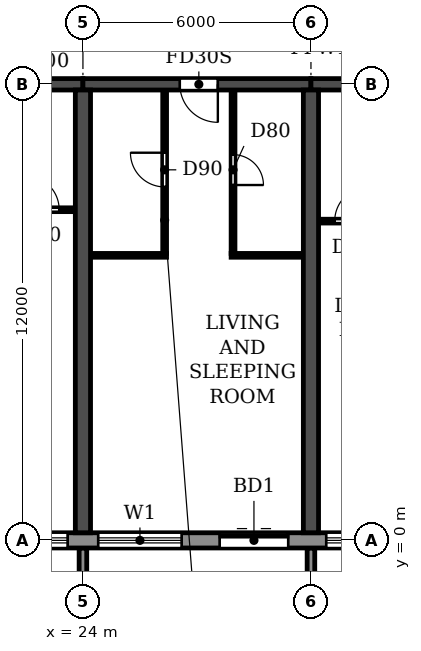
"""IFC4 building model, lengths in metres.
Left out: names, types, materials, properties, quantities, classifications, styles, units other than length and angle.
Written with IfcOpenShell. Run it as: python <this file> out.ifc"""

import sys

from ifc_helpers import new_model, si_unit, direction, frame, frame_2d, origin, place, context, subcontext, project, spatial, polyline, rectangle, outline, extrude, source, transform, mapped, element, fill, save


model = new_model("IFC4")
c1 = context("Model", 3, precision=1e-05, world=origin(), true_north=direction((0.0, 1.0)))
c2 = subcontext(c1, "Body", "Model", "MODEL_VIEW")
j1 = project(units=[si_unit("LENGTHUNIT", "METRE"), si_unit("PLANEANGLEUNIT", "RADIAN")], contexts=[c1])
p1 = place(None, origin())
s1 = spatial("IfcSite", under=j1, at=p1, CompositionType="ELEMENT")
p2 = place(p1, origin())
s2 = spatial("IfcBuilding", under=s1, at=p2, CompositionType="ELEMENT")
p3 = place(p2, frame((0.0, 0.0, 33.3)))
s3 = spatial("IfcBuildingStorey", under=s2, at=p3, CompositionType="ELEMENT", Elevation=33.3)
for number, where, z_axis, x_axis in (
    (1, (24.0, 0.2, 0.0), (0.0, 0.0, 1.0), (0.0, 1.0, 0.0)),
    (2, (30.0, 0.2, 0.0), (0.0, 0.0, 1.0), (0.0, 1.0, 0.0)),
):
    element("IfcWall", number, at=place(p3, frame(where, z_axis=z_axis, x_axis=x_axis)), inside=s3, PredefinedType="SHEAR", context=c2, shape_type="SweptSolid", body=[
        extrude(rectangle(XDim=11.65, YDim=0.4, at=frame_2d((5.825, 0.0))), origin(), (0.0, 0.0, 1.0), 3.05),
    ])
p4 = place(p3, frame((18.0, 12.0, 0.0), z_axis=(0.0, 0.0, 1.0), x_axis=(1.0, 0.0, 0.0)))
e3 = element("IfcWall", 3, at=p4, inside=s3, PredefinedType="SHEAR", context=c2, shape_type="SweptSolid", body=[
    extrude(rectangle(XDim=6.0, YDim=0.3, at=frame_2d((3.0, 0.0))), origin(), (0.0, 0.0, 1.0), 2.45),
])
p5 = place(p4, frame((2.45, 0.0, 0.0)))
e4 = element("IfcOpeningElement", 4, at=p5, cuts=e3, PredefinedType="OPENING", context=c2, shape_type="SweptSolid", body=[
    extrude(rectangle(XDim=1.0, YDim=2.1, at=frame_2d((0.5, 1.05))), frame((0.0, 0.16, 0.0), z_axis=(0.0, -1.0, 0.0), x_axis=(1.0, 0.0, 0.0)), (0.0, 0.0, 1.0), 0.32),
])
p6 = place(p3, frame((24.0, 12.0, 0.0), z_axis=(0.0, 0.0, 1.0), x_axis=(1.0, 0.0, 0.0)))
e5 = element("IfcWall", 5, at=p6, inside=s3, PredefinedType="SHEAR", context=c2, shape_type="SweptSolid", body=[
    extrude(rectangle(XDim=6.0, YDim=0.3, at=frame_2d((3.0, 0.0))), origin(), (0.0, 0.0, 1.0), 2.45),
])
p7 = place(p6, frame((2.55, 0.0, 0.0)))
e6 = element("IfcOpeningElement", 6, at=p7, cuts=e5, PredefinedType="OPENING", context=c2, shape_type="SweptSolid", body=[
    extrude(rectangle(XDim=1.0, YDim=2.1, at=frame_2d((0.5, 1.05))), frame((0.0, 0.16, 0.0), z_axis=(0.0, -1.0, 0.0), x_axis=(1.0, 0.0, 0.0)), (0.0, 0.0, 1.0), 0.32),
])
p8 = place(p3, frame((30.0, 12.0, 0.0), z_axis=(0.0, 0.0, 1.0), x_axis=(1.0, 0.0, 0.0)))
e7 = element("IfcWall", 7, at=p8, inside=s3, PredefinedType="SHEAR", context=c2, shape_type="SweptSolid", body=[
    extrude(rectangle(XDim=6.0, YDim=0.3, at=frame_2d((3.0, 0.0))), origin(), (0.0, 0.0, 1.0), 2.45),
])
p9 = place(p8, frame((2.55, 0.0, 0.0)))
e8 = element("IfcOpeningElement", 8, at=p9, cuts=e7, PredefinedType="OPENING", context=c2, shape_type="SweptSolid", body=[
    extrude(rectangle(XDim=1.0, YDim=2.1, at=frame_2d((0.5, 1.05))), frame((0.0, 0.16, 0.0), z_axis=(0.0, -1.0, 0.0), x_axis=(1.0, 0.0, 0.0)), (0.0, 0.0, 1.0), 0.32),
])
p10 = place(p3, frame((4.683, 0.0, 0.0), z_axis=(0.0, 0.0, 1.0), x_axis=(1.0, 0.0, 0.0)))
e9 = element("IfcWall", 9, at=p10, inside=s3, PredefinedType="STANDARD", context=c2, shape_type="SweptSolid", body=[
    extrude(rectangle(XDim=92.634, YDim=0.4, at=frame_2d((46.317, 0.0))), origin(), (0.0, 0.0, 1.0), 3.05),
])
p11 = place(p10, frame((1.717, 0.0, 0.9)))
e10 = element("IfcOpeningElement", 10, at=p11, cuts=e9, PredefinedType="OPENING", context=c2, shape_type="SweptSolid", body=[
    extrude(rectangle(XDim=2.2, YDim=1.5, at=frame_2d((1.1, 0.75))), frame((0.0, 0.21, 0.0), z_axis=(0.0, -1.0, 0.0), x_axis=(1.0, 0.0, 0.0)), (0.0, 0.0, 1.0), 0.42),
])
p12 = place(p10, frame((4.717, 0.0, 0.9)))
e11 = element("IfcOpeningElement", 11, at=p12, cuts=e9, PredefinedType="OPENING", context=c2, shape_type="SweptSolid", body=[
    extrude(rectangle(XDim=2.2, YDim=1.5, at=frame_2d((1.1, 0.75))), frame((0.0, 0.21, 0.0), z_axis=(0.0, -1.0, 0.0), x_axis=(1.0, 0.0, 0.0)), (0.0, 0.0, 1.0), 0.42),
])
p13 = place(p10, frame((7.917, 0.0, 0.0)))
e12 = element("IfcOpeningElement", 12, at=p13, cuts=e9, PredefinedType="OPENING", context=c2, shape_type="SweptSolid", body=[
    extrude(rectangle(XDim=1.8, YDim=2.4, at=frame_2d((0.9, 1.2))), frame((0.0, 0.21, 0.0), z_axis=(0.0, -1.0, 0.0), x_axis=(1.0, 0.0, 0.0)), (0.0, 0.0, 1.0), 0.42),
])
p14 = place(p10, frame((10.717, 0.0, 0.9)))
e13 = element("IfcOpeningElement", 13, at=p14, cuts=e9, PredefinedType="OPENING", context=c2, shape_type="SweptSolid", body=[
    extrude(rectangle(XDim=2.2, YDim=1.5, at=frame_2d((1.1, 0.75))), frame((0.0, 0.21, 0.0), z_axis=(0.0, -1.0, 0.0), x_axis=(1.0, 0.0, 0.0)), (0.0, 0.0, 1.0), 0.42),
])
p15 = place(p10, frame((13.717, 0.0, 0.9)))
e14 = element("IfcOpeningElement", 14, at=p15, cuts=e9, PredefinedType="OPENING", context=c2, shape_type="SweptSolid", body=[
    extrude(rectangle(XDim=2.2, YDim=1.5, at=frame_2d((1.1, 0.75))), frame((0.0, 0.21, 0.0), z_axis=(0.0, -1.0, 0.0), x_axis=(1.0, 0.0, 0.0)), (0.0, 0.0, 1.0), 0.42),
])
p16 = place(p10, frame((16.717, 0.0, 0.9)))
e15 = element("IfcOpeningElement", 15, at=p16, cuts=e9, PredefinedType="OPENING", context=c2, shape_type="SweptSolid", body=[
    extrude(rectangle(XDim=2.2, YDim=1.5, at=frame_2d((1.1, 0.75))), frame((0.0, 0.21, 0.0), z_axis=(0.0, -1.0, 0.0), x_axis=(1.0, 0.0, 0.0)), (0.0, 0.0, 1.0), 0.42),
])
p17 = place(p10, frame((19.717, 0.0, 0.9)))
e16 = element("IfcOpeningElement", 16, at=p17, cuts=e9, PredefinedType="OPENING", context=c2, shape_type="SweptSolid", body=[
    extrude(rectangle(XDim=2.2, YDim=1.5, at=frame_2d((1.1, 0.75))), frame((0.0, 0.21, 0.0), z_axis=(0.0, -1.0, 0.0), x_axis=(1.0, 0.0, 0.0)), (0.0, 0.0, 1.0), 0.42),
])
p18 = place(p10, frame((22.917, 0.0, 0.0)))
e17 = element("IfcOpeningElement", 17, at=p18, cuts=e9, PredefinedType="OPENING", context=c2, shape_type="SweptSolid", body=[
    extrude(rectangle(XDim=1.8, YDim=2.4, at=frame_2d((0.9, 1.2))), frame((0.0, 0.21, 0.0), z_axis=(0.0, -1.0, 0.0), x_axis=(1.0, 0.0, 0.0)), (0.0, 0.0, 1.0), 0.42),
])
p19 = place(p10, frame((25.717, 0.0, 0.9)))
e18 = element("IfcOpeningElement", 18, at=p19, cuts=e9, PredefinedType="OPENING", context=c2, shape_type="SweptSolid", body=[
    extrude(rectangle(XDim=2.2, YDim=1.5, at=frame_2d((1.1, 0.75))), frame((0.0, 0.21, 0.0), z_axis=(0.0, -1.0, 0.0), x_axis=(1.0, 0.0, 0.0)), (0.0, 0.0, 1.0), 0.42),
])
p20 = place(p10, frame((28.717, 0.0, 0.9)))
e19 = element("IfcOpeningElement", 19, at=p20, cuts=e9, PredefinedType="OPENING", context=c2, shape_type="SweptSolid", body=[
    extrude(rectangle(XDim=2.2, YDim=1.5, at=frame_2d((1.1, 0.75))), frame((0.0, 0.21, 0.0), z_axis=(0.0, -1.0, 0.0), x_axis=(1.0, 0.0, 0.0)), (0.0, 0.0, 1.0), 0.42),
])
p21 = place(p10, frame((31.717, 0.0, 0.9)))
e20 = element("IfcOpeningElement", 20, at=p21, cuts=e9, PredefinedType="OPENING", context=c2, shape_type="SweptSolid", body=[
    extrude(rectangle(XDim=2.2, YDim=1.5, at=frame_2d((1.1, 0.75))), frame((0.0, 0.21, 0.0), z_axis=(0.0, -1.0, 0.0), x_axis=(1.0, 0.0, 0.0)), (0.0, 0.0, 1.0), 0.42),
])
p22 = place(p10, frame((34.717, 0.0, 0.9)))
e21 = element("IfcOpeningElement", 21, at=p22, cuts=e9, PredefinedType="OPENING", context=c2, shape_type="SweptSolid", body=[
    extrude(rectangle(XDim=2.2, YDim=1.5, at=frame_2d((1.1, 0.75))), frame((0.0, 0.21, 0.0), z_axis=(0.0, -1.0, 0.0), x_axis=(1.0, 0.0, 0.0)), (0.0, 0.0, 1.0), 0.42),
])
p23 = place(p10, frame((37.717, 0.0, 0.9)))
e22 = element("IfcOpeningElement", 22, at=p23, cuts=e9, PredefinedType="OPENING", context=c2, shape_type="SweptSolid", body=[
    extrude(rectangle(XDim=2.2, YDim=1.5, at=frame_2d((1.1, 0.75))), frame((0.0, 0.21, 0.0), z_axis=(0.0, -1.0, 0.0), x_axis=(1.0, 0.0, 0.0)), (0.0, 0.0, 1.0), 0.42),
])
p24 = place(p10, frame((40.717, 0.0, 0.9)))
e23 = element("IfcOpeningElement", 23, at=p24, cuts=e9, PredefinedType="OPENING", context=c2, shape_type="SweptSolid", body=[
    extrude(rectangle(XDim=2.2, YDim=1.5, at=frame_2d((1.1, 0.75))), frame((0.0, 0.21, 0.0), z_axis=(0.0, -1.0, 0.0), x_axis=(1.0, 0.0, 0.0)), (0.0, 0.0, 1.0), 0.42),
])
p25 = place(p10, frame((43.717, 0.0, 0.9)))
e24 = element("IfcOpeningElement", 24, at=p25, cuts=e9, PredefinedType="OPENING", context=c2, shape_type="SweptSolid", body=[
    extrude(rectangle(XDim=2.2, YDim=1.5, at=frame_2d((1.1, 0.75))), frame((0.0, 0.21, 0.0), z_axis=(0.0, -1.0, 0.0), x_axis=(1.0, 0.0, 0.0)), (0.0, 0.0, 1.0), 0.42),
])
p26 = place(p10, frame((46.917, 0.0, 0.0)))
e25 = element("IfcOpeningElement", 25, at=p26, cuts=e9, PredefinedType="OPENING", context=c2, shape_type="SweptSolid", body=[
    extrude(rectangle(XDim=1.8, YDim=2.4, at=frame_2d((0.9, 1.2))), frame((0.0, 0.21, 0.0), z_axis=(0.0, -1.0, 0.0), x_axis=(1.0, 0.0, 0.0)), (0.0, 0.0, 1.0), 0.42),
])
p27 = place(p10, frame((49.717, 0.0, 0.9)))
e26 = element("IfcOpeningElement", 26, at=p27, cuts=e9, PredefinedType="OPENING", context=c2, shape_type="SweptSolid", body=[
    extrude(rectangle(XDim=2.2, YDim=1.5, at=frame_2d((1.1, 0.75))), frame((0.0, 0.21, 0.0), z_axis=(0.0, -1.0, 0.0), x_axis=(1.0, 0.0, 0.0)), (0.0, 0.0, 1.0), 0.42),
])
p28 = place(p10, frame((52.717, 0.0, 0.9)))
e27 = element("IfcOpeningElement", 27, at=p28, cuts=e9, PredefinedType="OPENING", context=c2, shape_type="SweptSolid", body=[
    extrude(rectangle(XDim=2.2, YDim=1.5, at=frame_2d((1.1, 0.75))), frame((0.0, 0.21, 0.0), z_axis=(0.0, -1.0, 0.0), x_axis=(1.0, 0.0, 0.0)), (0.0, 0.0, 1.0), 0.42),
])
p29 = place(p10, frame((55.717, 0.0, 0.9)))
e28 = element("IfcOpeningElement", 28, at=p29, cuts=e9, PredefinedType="OPENING", context=c2, shape_type="SweptSolid", body=[
    extrude(rectangle(XDim=2.2, YDim=1.5, at=frame_2d((1.1, 0.75))), frame((0.0, 0.21, 0.0), z_axis=(0.0, -1.0, 0.0), x_axis=(1.0, 0.0, 0.0)), (0.0, 0.0, 1.0), 0.42),
])
p30 = place(p10, frame((58.917, 0.0, 0.0)))
e29 = element("IfcOpeningElement", 29, at=p30, cuts=e9, PredefinedType="OPENING", context=c2, shape_type="SweptSolid", body=[
    extrude(rectangle(XDim=1.8, YDim=2.4, at=frame_2d((0.9, 1.2))), frame((0.0, 0.21, 0.0), z_axis=(0.0, -1.0, 0.0), x_axis=(1.0, 0.0, 0.0)), (0.0, 0.0, 1.0), 0.42),
])
p31 = place(p10, frame((61.717, 0.0, 0.9)))
e30 = element("IfcOpeningElement", 30, at=p31, cuts=e9, PredefinedType="OPENING", context=c2, shape_type="SweptSolid", body=[
    extrude(rectangle(XDim=2.2, YDim=1.5, at=frame_2d((1.1, 0.75))), frame((0.0, 0.21, 0.0), z_axis=(0.0, -1.0, 0.0), x_axis=(1.0, 0.0, 0.0)), (0.0, 0.0, 1.0), 0.42),
])
p32 = place(p10, frame((64.717, 0.0, 0.9)))
e31 = element("IfcOpeningElement", 31, at=p32, cuts=e9, PredefinedType="OPENING", context=c2, shape_type="SweptSolid", body=[
    extrude(rectangle(XDim=2.2, YDim=1.5, at=frame_2d((1.1, 0.75))), frame((0.0, 0.21, 0.0), z_axis=(0.0, -1.0, 0.0), x_axis=(1.0, 0.0, 0.0)), (0.0, 0.0, 1.0), 0.42),
])
p33 = place(p10, frame((67.717, 0.0, 0.9)))
e32 = element("IfcOpeningElement", 32, at=p33, cuts=e9, PredefinedType="OPENING", context=c2, shape_type="SweptSolid", body=[
    extrude(rectangle(XDim=2.2, YDim=1.5, at=frame_2d((1.1, 0.75))), frame((0.0, 0.21, 0.0), z_axis=(0.0, -1.0, 0.0), x_axis=(1.0, 0.0, 0.0)), (0.0, 0.0, 1.0), 0.42),
])
p34 = place(p10, frame((70.917, 0.0, 0.0)))
e33 = element("IfcOpeningElement", 33, at=p34, cuts=e9, PredefinedType="OPENING", context=c2, shape_type="SweptSolid", body=[
    extrude(rectangle(XDim=1.8, YDim=2.4, at=frame_2d((0.9, 1.2))), frame((0.0, 0.21, 0.0), z_axis=(0.0, -1.0, 0.0), x_axis=(1.0, 0.0, 0.0)), (0.0, 0.0, 1.0), 0.42),
])
p35 = place(p10, frame((73.717, 0.0, 0.9)))
e34 = element("IfcOpeningElement", 34, at=p35, cuts=e9, PredefinedType="OPENING", context=c2, shape_type="SweptSolid", body=[
    extrude(rectangle(XDim=2.2, YDim=1.5, at=frame_2d((1.1, 0.75))), frame((0.0, 0.21, 0.0), z_axis=(0.0, -1.0, 0.0), x_axis=(1.0, 0.0, 0.0)), (0.0, 0.0, 1.0), 0.42),
])
p36 = place(p10, frame((76.717, 0.0, 0.9)))
e35 = element("IfcOpeningElement", 35, at=p36, cuts=e9, PredefinedType="OPENING", context=c2, shape_type="SweptSolid", body=[
    extrude(rectangle(XDim=2.2, YDim=1.5, at=frame_2d((1.1, 0.75))), frame((0.0, 0.21, 0.0), z_axis=(0.0, -1.0, 0.0), x_axis=(1.0, 0.0, 0.0)), (0.0, 0.0, 1.0), 0.42),
])
p37 = place(p10, frame((79.717, 0.0, 0.9)))
e36 = element("IfcOpeningElement", 36, at=p37, cuts=e9, PredefinedType="OPENING", context=c2, shape_type="SweptSolid", body=[
    extrude(rectangle(XDim=2.2, YDim=1.5, at=frame_2d((1.1, 0.75))), frame((0.0, 0.21, 0.0), z_axis=(0.0, -1.0, 0.0), x_axis=(1.0, 0.0, 0.0)), (0.0, 0.0, 1.0), 0.42),
])
p38 = place(p10, frame((82.717, 0.0, 0.9)))
e37 = element("IfcOpeningElement", 37, at=p38, cuts=e9, PredefinedType="OPENING", context=c2, shape_type="SweptSolid", body=[
    extrude(rectangle(XDim=2.2, YDim=1.5, at=frame_2d((1.1, 0.75))), frame((0.0, 0.21, 0.0), z_axis=(0.0, -1.0, 0.0), x_axis=(1.0, 0.0, 0.0)), (0.0, 0.0, 1.0), 0.42),
])
p39 = place(p10, frame((85.717, 0.0, 0.9)))
e38 = element("IfcOpeningElement", 38, at=p39, cuts=e9, PredefinedType="OPENING", context=c2, shape_type="SweptSolid", body=[
    extrude(rectangle(XDim=2.2, YDim=1.5, at=frame_2d((1.1, 0.75))), frame((0.0, 0.21, 0.0), z_axis=(0.0, -1.0, 0.0), x_axis=(1.0, 0.0, 0.0)), (0.0, 0.0, 1.0), 0.42),
])
p40 = place(p10, frame((88.717, 0.0, 0.9)))
e39 = element("IfcOpeningElement", 39, at=p40, cuts=e9, PredefinedType="OPENING", context=c2, shape_type="SweptSolid", body=[
    extrude(rectangle(XDim=2.2, YDim=1.5, at=frame_2d((1.1, 0.75))), frame((0.0, 0.21, 0.0), z_axis=(0.0, -1.0, 0.0), x_axis=(1.0, 0.0, 0.0)), (0.0, 0.0, 1.0), 0.42),
])
m1 = source(origin(), c2, "Body", "SweptSolid", [
    extrude(outline(polyline([(0.0, 0.0), (0.2, 0.0), (0.2, 1.65), (0.0, 1.65), (0.0, 0.0)])), origin(), (0.0, 0.0, 1.0), 3.1),
])
for number, where in (
    (40, (23.9, -1.85, 0.0)),
    (41, (29.9, -1.85, 0.0)),
):
    element("IfcWall", number, at=place(p3, frame(where)), inside=s3, PredefinedType="STANDARD", context=c2, shape_type="MappedRepresentation", body=[
        mapped(m1, transform((0.0, 0.0, 0.0))),
    ])
p41 = place(p3, frame((24.21, 7.5, 0.0), z_axis=(0.0, 0.0, 1.0), x_axis=(1.0, 0.0, 0.0)))
e42 = element("IfcWall", 42, at=p41, inside=s3, PredefinedType="PARTITIONING", context=c2, shape_type="SweptSolid", body=[
    extrude(rectangle(XDim=1.99, YDim=0.1, at=frame_2d((0.995, 0.0))), origin(), (0.0, 0.0, 1.0), 3.05),
])
p42 = place(p3, frame((27.9, 7.5, 0.0), z_axis=(0.0, 0.0, 1.0), x_axis=(1.0, 0.0, 0.0)))
e43 = element("IfcWall", 43, at=p42, inside=s3, PredefinedType="PARTITIONING", context=c2, shape_type="SweptSolid", body=[
    extrude(rectangle(XDim=1.89, YDim=0.1, at=frame_2d((0.945, 0.0))), origin(), (0.0, 0.0, 1.0), 3.05),
])
p43 = place(p3, frame((30.21, 8.4, 0.0), z_axis=(0.0, 0.0, 1.0), x_axis=(1.0, 0.0, 0.0)))
e44 = element("IfcWall", 44, at=p43, inside=s3, PredefinedType="PARTITIONING", context=c2, shape_type="SweptSolid", body=[
    extrude(rectangle(XDim=1.99, YDim=0.1, at=frame_2d((0.995, 0.0))), origin(), (0.0, 0.0, 1.0), 3.05),
])
p44 = place(p43, frame((0.415, 0.0, 0.0)))
e45 = element("IfcOpeningElement", 45, at=p44, cuts=e44, PredefinedType="OPENING", context=c2, shape_type="SweptSolid", body=[
    extrude(rectangle(XDim=0.9, YDim=2.1, at=frame_2d((0.45, 1.05))), frame((0.0, 0.06, 0.0), z_axis=(0.0, -1.0, 0.0), x_axis=(1.0, 0.0, 0.0)), (0.0, 0.0, 1.0), 0.12),
])
p45 = place(p3, frame((21.8, 8.7, 0.0), z_axis=(0.0, 0.0, 1.0), x_axis=(1.0, 0.0, 0.0)))
e46 = element("IfcWall", 46, at=p45, inside=s3, PredefinedType="PARTITIONING", context=c2, shape_type="SweptSolid", body=[
    extrude(rectangle(XDim=1.99, YDim=0.1, at=frame_2d((0.995, 0.0))), origin(), (0.0, 0.0, 1.0), 3.05),
])
p46 = place(p45, frame((0.675, 0.0, 0.0)))
e47 = element("IfcOpeningElement", 47, at=p46, cuts=e46, PredefinedType="OPENING", context=c2, shape_type="SweptSolid", body=[
    extrude(rectangle(XDim=0.9, YDim=2.1, at=frame_2d((0.45, 1.05))), frame((0.0, 0.06, 0.0), z_axis=(0.0, -1.0, 0.0), x_axis=(1.0, 0.0, 0.0)), (0.0, 0.0, 1.0), 0.12),
])
p47 = place(p3, frame((26.15, 7.55, 0.0), z_axis=(0.0, 0.0, 1.0), x_axis=(0.0, 1.0, 0.0)))
e48 = element("IfcWall", 48, at=p47, inside=s3, PredefinedType="PARTITIONING", context=c2, shape_type="SweptSolid", body=[
    extrude(rectangle(XDim=4.29, YDim=0.1, at=frame_2d((2.145, 0.0))), origin(), (0.0, 0.0, 1.0), 3.05),
])
p48 = place(p47, frame((1.75, 0.0, 0.0)))
e49 = element("IfcOpeningElement", 49, at=p48, cuts=e48, PredefinedType="OPENING", context=c2, shape_type="SweptSolid", body=[
    extrude(rectangle(XDim=0.9, YDim=2.1, at=frame_2d((0.45, 1.05))), frame((0.0, 0.06, 0.0), z_axis=(0.0, -1.0, 0.0), x_axis=(1.0, 0.0, 0.0)), (0.0, 0.0, 1.0), 0.12),
])
p49 = place(p3, frame((27.95, 7.55, 0.0), z_axis=(0.0, 0.0, 1.0), x_axis=(0.0, 1.0, 0.0)))
e50 = element("IfcWall", 50, at=p49, inside=s3, PredefinedType="PARTITIONING", context=c2, shape_type="SweptSolid", body=[
    extrude(rectangle(XDim=4.29, YDim=0.1, at=frame_2d((2.145, 0.0))), origin(), (0.0, 0.0, 1.0), 3.05),
])
p50 = place(p49, frame((1.8, 0.0, 0.0)))
e51 = element("IfcOpeningElement", 51, at=p50, cuts=e50, PredefinedType="OPENING", context=c2, shape_type="SweptSolid", body=[
    extrude(rectangle(XDim=0.8, YDim=2.1, at=frame_2d((0.4, 1.05))), frame((0.0, 0.06, 0.0), z_axis=(0.0, -1.0, 0.0), x_axis=(1.0, 0.0, 0.0)), (0.0, 0.0, 1.0), 0.12),
])
p51 = place(p16, origin())
e52 = element("IfcWindow", 52, at=p51, inside=s3, PartitioningType="DOUBLE_PANEL_HORIZONTAL", PredefinedType="WINDOW", context=c2, shape_type="SweptSolid", body=[
    extrude(rectangle(XDim=2.2, YDim=1.5, at=frame_2d((1.1, 0.75))), frame((0.0, 0.03, 0.0), z_axis=(0.0, -1.0, 0.0), x_axis=(1.0, 0.0, 0.0)), (0.0, 0.0, 1.0), 0.06),
])
fill(e15, e52)
p52 = place(p17, origin())
e53 = element("IfcWindow", 53, at=p52, inside=s3, PartitioningType="DOUBLE_PANEL_HORIZONTAL", PredefinedType="WINDOW", context=c2, shape_type="SweptSolid", body=[
    extrude(rectangle(XDim=2.2, YDim=1.5, at=frame_2d((1.1, 0.75))), frame((0.0, 0.03, 0.0), z_axis=(0.0, -1.0, 0.0), x_axis=(1.0, 0.0, 0.0)), (0.0, 0.0, 1.0), 0.06),
])
fill(e16, e53)
p53 = place(p18, origin())
e54 = element("IfcDoor", 54, at=p53, inside=s3, OperationType="DOUBLE_DOOR_SLIDING", PredefinedType="DOOR", context=c2, shape_type="SweptSolid", body=[
    extrude(rectangle(XDim=1.8, YDim=2.4, at=frame_2d((0.9, 1.2))), frame((0.0, 0.025, 0.0), z_axis=(0.0, -1.0, 0.0), x_axis=(1.0, 0.0, 0.0)), (0.0, 0.0, 1.0), 0.05),
])
fill(e17, e54)
p54 = place(p19, origin())
e55 = element("IfcWindow", 55, at=p54, inside=s3, PartitioningType="DOUBLE_PANEL_HORIZONTAL", PredefinedType="WINDOW", context=c2, shape_type="SweptSolid", body=[
    extrude(rectangle(XDim=2.2, YDim=1.5, at=frame_2d((1.1, 0.75))), frame((0.0, 0.03, 0.0), z_axis=(0.0, -1.0, 0.0), x_axis=(1.0, 0.0, 0.0)), (0.0, 0.0, 1.0), 0.06),
])
fill(e18, e55)
p55 = place(p46, origin())
e56 = element("IfcDoor", 56, at=p55, inside=s3, OperationType="SINGLE_SWING_LEFT", PredefinedType="DOOR", context=c2, shape_type="SweptSolid", body=[
    extrude(rectangle(XDim=0.9, YDim=2.1, at=frame_2d((0.45, 1.05))), frame((0.0, 0.025, 0.0), z_axis=(0.0, -1.0, 0.0), x_axis=(1.0, 0.0, 0.0)), (0.0, 0.0, 1.0), 0.05),
])
fill(e47, e56)
p56 = place(p48, origin())
e57 = element("IfcDoor", 57, at=p56, inside=s3, OperationType="SINGLE_SWING_RIGHT", PredefinedType="DOOR", context=c2, shape_type="SweptSolid", body=[
    extrude(rectangle(XDim=0.9, YDim=2.1, at=frame_2d((0.45, 1.05))), frame((0.0, 0.025, 0.0), z_axis=(0.0, -1.0, 0.0), x_axis=(1.0, 0.0, 0.0)), (0.0, 0.0, 1.0), 0.05),
])
fill(e49, e57)
p57 = place(p7, frame((1.0, 0.0, 0.0), z_axis=(0.0, 0.0, 1.0), x_axis=(-1.0, 0.0, 0.0)))
e58 = element("IfcDoor", 58, at=p57, inside=s3, OperationType="SINGLE_SWING_LEFT", PredefinedType="DOOR", context=c2, shape_type="SweptSolid", body=[
    extrude(rectangle(XDim=1.0, YDim=2.1, at=frame_2d((0.5, 1.05))), frame((0.0, 0.025, 0.0), z_axis=(0.0, -1.0, 0.0), x_axis=(1.0, 0.0, 0.0)), (0.0, 0.0, 1.0), 0.05),
])
fill(e6, e58)
p58 = place(p50, frame((0.8, 0.0, 0.0), z_axis=(0.0, 0.0, 1.0), x_axis=(-1.0, 0.0, 0.0)))
e59 = element("IfcDoor", 59, at=p58, inside=s3, OperationType="SINGLE_SWING_RIGHT", PredefinedType="DOOR", context=c2, shape_type="SweptSolid", body=[
    extrude(rectangle(XDim=0.8, YDim=2.1, at=frame_2d((0.4, 1.05))), frame((0.0, 0.025, 0.0), z_axis=(0.0, -1.0, 0.0), x_axis=(1.0, 0.0, 0.0)), (0.0, 0.0, 1.0), 0.05),
])
fill(e51, e59)
p59 = place(p44, origin())
e60 = element("IfcDoor", 60, at=p59, inside=s3, OperationType="SINGLE_SWING_RIGHT", PredefinedType="DOOR", context=c2, shape_type="SweptSolid", body=[
    extrude(rectangle(XDim=0.9, YDim=2.1, at=frame_2d((0.45, 1.05))), frame((0.0, 0.025, 0.0), z_axis=(0.0, -1.0, 0.0), x_axis=(1.0, 0.0, 0.0)), (0.0, 0.0, 1.0), 0.05),
])
fill(e45, e60)
save(model, sys.argv[1])
